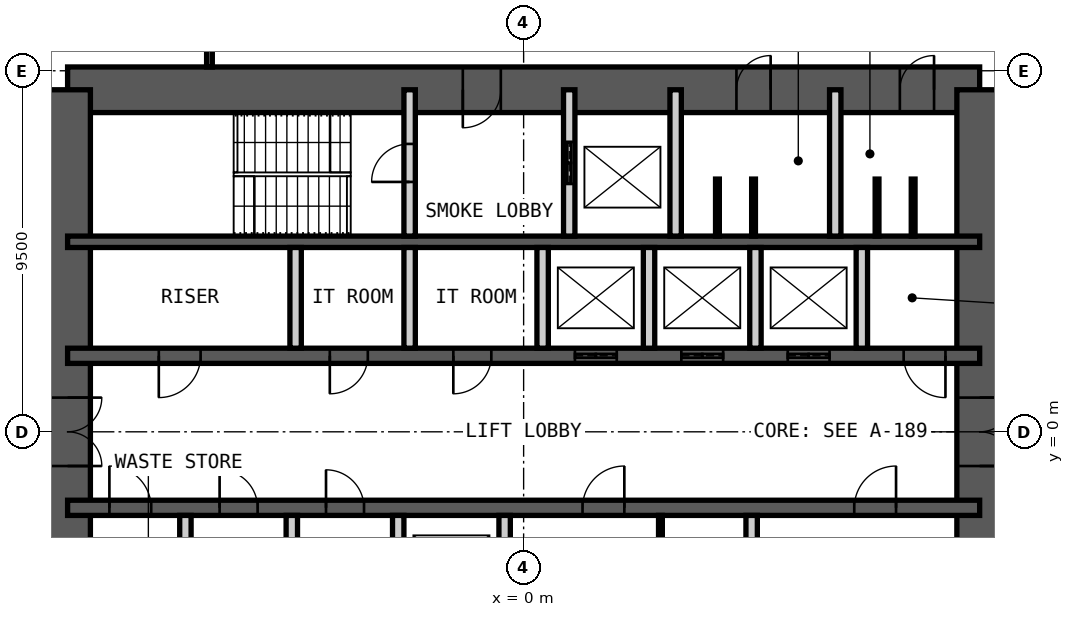
"""IFC4 building model, lengths in metres.
Left out: names, types, materials, properties, quantities, classifications, styles, units other than length and angle.
Written with IfcOpenShell. Run it as: python <this file> out.ifc"""

import sys

from ifc_helpers import new_model, si_unit, direction, frame, frame_2d, origin, place, context, subcontext, project, spatial, rectangle, extrude, element, fill, save


model = new_model("IFC4")
c1 = context("Model", 3, precision=1e-05, world=origin(), true_north=direction((0.0, 1.0)))
c2 = subcontext(c1, "Body", "Model", "MODEL_VIEW")
j1 = project(units=[si_unit("LENGTHUNIT", "METRE"), si_unit("PLANEANGLEUNIT", "RADIAN")], contexts=[c1])
p1 = place(None, origin())
s1 = spatial("IfcSite", under=j1, at=p1, CompositionType="ELEMENT")
p2 = place(p1, origin())
s2 = spatial("IfcBuilding", under=s1, at=p2, CompositionType="ELEMENT")
p3 = place(p2, frame((0.0, 0.0, 222.4)))
s3 = spatial("IfcBuildingStorey", under=s2, at=p3, CompositionType="ELEMENT", Elevation=222.4)
p4 = place(p3, frame((-12.0, 9.0, 0.0), z_axis=(0.0, 0.0, 1.0), x_axis=(1.0, 0.0, 0.0)))
e1 = element("IfcWall", 1, at=p4, inside=s3, PredefinedType="SHEAR", context=c2, shape_type="SweptSolid", body=[
    extrude(rectangle(XDim=24.0, YDim=1.2, at=frame_2d((12.0, 0.0))), origin(), (0.0, 0.0, 1.0), 4.2),
])
p5 = place(p4, frame((10.4, 0.0, 0.0)))
e2 = element("IfcOpeningElement", 2, at=p5, cuts=e1, PredefinedType="OPENING", context=c2, shape_type="SweptSolid", body=[
    extrude(rectangle(XDim=1.0, YDim=2.1, at=frame_2d((0.5, 1.05))), frame((0.0, 0.61, 0.0), z_axis=(0.0, -1.0, 0.0), x_axis=(1.0, 0.0, 0.0)), (0.0, 0.0, 1.0), 1.22),
])
p6 = place(p4, frame((17.6, 0.0, 0.0)))
e3 = element("IfcOpeningElement", 3, at=p6, cuts=e1, PredefinedType="OPENING", context=c2, shape_type="SweptSolid", body=[
    extrude(rectangle(XDim=0.9, YDim=2.1, at=frame_2d((0.45, 1.05))), frame((0.0, 0.61, 0.0), z_axis=(0.0, -1.0, 0.0), x_axis=(1.0, 0.0, 0.0)), (0.0, 0.0, 1.0), 1.22),
])
p7 = place(p4, frame((21.9, 0.0, 0.0)))
e4 = element("IfcOpeningElement", 4, at=p7, cuts=e1, PredefinedType="OPENING", context=c2, shape_type="SweptSolid", body=[
    extrude(rectangle(XDim=0.9, YDim=2.1, at=frame_2d((0.45, 1.05))), frame((0.0, 0.61, 0.0), z_axis=(0.0, -1.0, 0.0), x_axis=(1.0, 0.0, 0.0)), (0.0, 0.0, 1.0), 1.22),
])
p8 = place(p3, frame((12.0, -9.0, 0.0), z_axis=(0.0, 0.0, 1.0), x_axis=(0.0, 1.0, 0.0)))
e5 = element("IfcWall", 5, at=p8, inside=s3, PredefinedType="SHEAR", context=c2, shape_type="SweptSolid", body=[
    extrude(rectangle(XDim=18.0, YDim=1.2, at=frame_2d((9.0, 0.0))), origin(), (0.0, 0.0, 1.0), 4.2),
])
p9 = place(p8, frame((8.1, 0.0, 0.0)))
e6 = element("IfcOpeningElement", 6, at=p9, cuts=e5, PredefinedType="OPENING", context=c2, shape_type="SweptSolid", body=[
    extrude(rectangle(XDim=1.8, YDim=2.1, at=frame_2d((0.9, 1.05))), frame((0.0, 0.61, 0.0), z_axis=(0.0, -1.0, 0.0), x_axis=(1.0, 0.0, 0.0)), (0.0, 0.0, 1.0), 1.22),
])
p10 = place(p3, frame((-12.0, -9.0, 0.0), z_axis=(0.0, 0.0, 1.0), x_axis=(0.0, 1.0, 0.0)))
e7 = element("IfcWall", 7, at=p10, inside=s3, PredefinedType="SHEAR", context=c2, shape_type="SweptSolid", body=[
    extrude(rectangle(XDim=18.0, YDim=1.2, at=frame_2d((9.0, 0.0))), origin(), (0.0, 0.0, 1.0), 4.2),
])
p11 = place(p10, frame((8.1, 0.0, 0.0)))
e8 = element("IfcOpeningElement", 8, at=p11, cuts=e7, PredefinedType="OPENING", context=c2, shape_type="SweptSolid", body=[
    extrude(rectangle(XDim=1.8, YDim=2.1, at=frame_2d((0.9, 1.05))), frame((0.0, 0.61, 0.0), z_axis=(0.0, -1.0, 0.0), x_axis=(1.0, 0.0, 0.0)), (0.0, 0.0, 1.0), 1.22),
])
p12 = place(p3, frame((-12.0, 5.0, 0.0), z_axis=(0.0, 0.0, 1.0), x_axis=(1.0, 0.0, 0.0)))
e9 = element("IfcWall", 9, at=p12, inside=s3, PredefinedType="SHEAR", context=c2, shape_type="SweptSolid", body=[
    extrude(rectangle(XDim=24.0, YDim=0.3, at=frame_2d((12.0, 0.0))), origin(), (0.0, 0.0, 1.0), 4.2),
])
p13 = place(p3, frame((-12.0, 2.0, 0.0), z_axis=(0.0, 0.0, 1.0), x_axis=(1.0, 0.0, 0.0)))
e10 = element("IfcWall", 10, at=p13, inside=s3, PredefinedType="SHEAR", context=c2, shape_type="SweptSolid", body=[
    extrude(rectangle(XDim=24.0, YDim=0.4, at=frame_2d((12.0, 0.0))), origin(), (0.0, 0.0, 1.0), 4.2),
])
p14 = place(p13, frame((2.4, 0.0, 0.0)))
e11 = element("IfcOpeningElement", 11, at=p14, cuts=e10, PredefinedType="OPENING", context=c2, shape_type="SweptSolid", body=[
    extrude(rectangle(XDim=1.1, YDim=2.1, at=frame_2d((0.55, 1.05))), frame((0.0, 0.21, 0.0), z_axis=(0.0, -1.0, 0.0), x_axis=(1.0, 0.0, 0.0)), (0.0, 0.0, 1.0), 0.42),
])
p15 = place(p13, frame((22.0, 0.0, 0.0)))
e12 = element("IfcOpeningElement", 12, at=p15, cuts=e10, PredefinedType="OPENING", context=c2, shape_type="SweptSolid", body=[
    extrude(rectangle(XDim=1.1, YDim=2.1, at=frame_2d((0.55, 1.05))), frame((0.0, 0.21, 0.0), z_axis=(0.0, -1.0, 0.0), x_axis=(1.0, 0.0, 0.0)), (0.0, 0.0, 1.0), 0.42),
])
p16 = place(p13, frame((10.15, 0.0, 0.0)))
e13 = element("IfcOpeningElement", 13, at=p16, cuts=e10, PredefinedType="OPENING", context=c2, shape_type="SweptSolid", body=[
    extrude(rectangle(XDim=1.0, YDim=2.1, at=frame_2d((0.5, 1.05))), frame((0.0, 0.21, 0.0), z_axis=(0.0, -1.0, 0.0), x_axis=(1.0, 0.0, 0.0)), (0.0, 0.0, 1.0), 0.42),
])
p17 = place(p13, frame((6.9, 0.0, 0.0)))
e14 = element("IfcOpeningElement", 14, at=p17, cuts=e10, PredefinedType="OPENING", context=c2, shape_type="SweptSolid", body=[
    extrude(rectangle(XDim=1.0, YDim=2.1, at=frame_2d((0.5, 1.05))), frame((0.0, 0.21, 0.0), z_axis=(0.0, -1.0, 0.0), x_axis=(1.0, 0.0, 0.0)), (0.0, 0.0, 1.0), 0.42),
])
p18 = place(p13, frame((13.35, 0.0, 0.0)))
e15 = element("IfcOpeningElement", 15, at=p18, cuts=e10, PredefinedType="OPENING", context=c2, shape_type="SweptSolid", body=[
    extrude(rectangle(XDim=1.1, YDim=2.4, at=frame_2d((0.55, 1.2))), frame((0.0, 0.21, 0.0), z_axis=(0.0, -1.0, 0.0), x_axis=(1.0, 0.0, 0.0)), (0.0, 0.0, 1.0), 0.42),
])
p19 = place(p13, frame((16.15, 0.0, 0.0)))
e16 = element("IfcOpeningElement", 16, at=p19, cuts=e10, PredefinedType="OPENING", context=c2, shape_type="SweptSolid", body=[
    extrude(rectangle(XDim=1.1, YDim=2.4, at=frame_2d((0.55, 1.2))), frame((0.0, 0.21, 0.0), z_axis=(0.0, -1.0, 0.0), x_axis=(1.0, 0.0, 0.0)), (0.0, 0.0, 1.0), 0.42),
])
p20 = place(p13, frame((18.95, 0.0, 0.0)))
e17 = element("IfcOpeningElement", 17, at=p20, cuts=e10, PredefinedType="OPENING", context=c2, shape_type="SweptSolid", body=[
    extrude(rectangle(XDim=1.1, YDim=2.4, at=frame_2d((0.55, 1.2))), frame((0.0, 0.21, 0.0), z_axis=(0.0, -1.0, 0.0), x_axis=(1.0, 0.0, 0.0)), (0.0, 0.0, 1.0), 0.42),
])
p21 = place(p3, frame((-12.0, -2.0, 0.0), z_axis=(0.0, 0.0, 1.0), x_axis=(1.0, 0.0, 0.0)))
e18 = element("IfcWall", 18, at=p21, inside=s3, PredefinedType="SHEAR", context=c2, shape_type="SweptSolid", body=[
    extrude(rectangle(XDim=24.0, YDim=0.4, at=frame_2d((12.0, 0.0))), origin(), (0.0, 0.0, 1.0), 4.2),
])
p22 = place(p21, frame((1.1, 0.0, 0.0)))
e19 = element("IfcOpeningElement", 19, at=p22, cuts=e18, PredefinedType="OPENING", context=c2, shape_type="SweptSolid", body=[
    extrude(rectangle(XDim=1.1, YDim=2.1, at=frame_2d((0.55, 1.05))), frame((0.0, 0.21, 0.0), z_axis=(0.0, -1.0, 0.0), x_axis=(1.0, 0.0, 0.0)), (0.0, 0.0, 1.0), 0.42),
])
p23 = place(p21, frame((13.55, 0.0, 0.0)))
e20 = element("IfcOpeningElement", 20, at=p23, cuts=e18, PredefinedType="OPENING", context=c2, shape_type="SweptSolid", body=[
    extrude(rectangle(XDim=1.1, YDim=2.1, at=frame_2d((0.55, 1.05))), frame((0.0, 0.21, 0.0), z_axis=(0.0, -1.0, 0.0), x_axis=(1.0, 0.0, 0.0)), (0.0, 0.0, 1.0), 0.42),
])
p24 = place(p21, frame((20.7, 0.0, 0.0)))
e21 = element("IfcOpeningElement", 21, at=p24, cuts=e18, PredefinedType="OPENING", context=c2, shape_type="SweptSolid", body=[
    extrude(rectangle(XDim=1.1, YDim=2.1, at=frame_2d((0.55, 1.05))), frame((0.0, 0.21, 0.0), z_axis=(0.0, -1.0, 0.0), x_axis=(1.0, 0.0, 0.0)), (0.0, 0.0, 1.0), 0.42),
])
p25 = place(p21, frame((4.0, 0.0, 0.0)))
e22 = element("IfcOpeningElement", 22, at=p25, cuts=e18, PredefinedType="OPENING", context=c2, shape_type="SweptSolid", body=[
    extrude(rectangle(XDim=1.0, YDim=2.1, at=frame_2d((0.5, 1.05))), frame((0.0, 0.21, 0.0), z_axis=(0.0, -1.0, 0.0), x_axis=(1.0, 0.0, 0.0)), (0.0, 0.0, 1.0), 0.42),
])
p26 = place(p21, frame((6.8, 0.0, 0.0)))
e23 = element("IfcOpeningElement", 23, at=p26, cuts=e18, PredefinedType="OPENING", context=c2, shape_type="SweptSolid", body=[
    extrude(rectangle(XDim=1.0, YDim=2.1, at=frame_2d((0.5, 1.05))), frame((0.0, 0.21, 0.0), z_axis=(0.0, -1.0, 0.0), x_axis=(1.0, 0.0, 0.0)), (0.0, 0.0, 1.0), 0.42),
])
p27 = place(p3, frame((-3.0, 5.15, 0.0), z_axis=(0.0, 0.0, 1.0), x_axis=(0.0, 1.0, 0.0)))
e24 = element("IfcWall", 24, at=p27, inside=s3, PredefinedType="PARTITIONING", context=c2, shape_type="SweptSolid", body=[
    extrude(rectangle(XDim=3.85, YDim=0.3, at=frame_2d((1.925, 0.0))), origin(), (0.0, 0.0, 1.0), 3.98),
])
p28 = place(p27, frame((1.425, 0.0, 0.0)))
e25 = element("IfcOpeningElement", 25, at=p28, cuts=e24, PredefinedType="OPENING", context=c2, shape_type="SweptSolid", body=[
    extrude(rectangle(XDim=1.0, YDim=2.1, at=frame_2d((0.5, 1.05))), frame((0.0, 0.16, 0.0), z_axis=(0.0, -1.0, 0.0), x_axis=(1.0, 0.0, 0.0)), (0.0, 0.0, 1.0), 0.32),
])
p29 = place(p3, frame((1.2, 5.15, 0.0), z_axis=(0.0, 0.0, 1.0), x_axis=(0.0, 1.0, 0.0)))
e26 = element("IfcWall", 26, at=p29, inside=s3, PredefinedType="PARTITIONING", context=c2, shape_type="SweptSolid", body=[
    extrude(rectangle(XDim=3.85, YDim=0.3, at=frame_2d((1.925, 0.0))), origin(), (0.0, 0.0, 1.0), 3.98),
])
p30 = place(p29, frame((1.375, 0.0, 0.0)))
e27 = element("IfcOpeningElement", 27, at=p30, cuts=e26, PredefinedType="OPENING", context=c2, shape_type="SweptSolid", body=[
    extrude(rectangle(XDim=1.1, YDim=2.4, at=frame_2d((0.55, 1.2))), frame((0.0, 0.16, 0.0), z_axis=(0.0, -1.0, 0.0), x_axis=(1.0, 0.0, 0.0)), (0.0, 0.0, 1.0), 0.32),
])
for number, where, z_axis, x_axis in (
    (28, (4.0, 5.15, 0.0), (0.0, 0.0, 1.0), (0.0, 1.0, 0.0)),
    (29, (8.2, 5.15, 0.0), (0.0, 0.0, 1.0), (0.0, 1.0, 0.0)),
):
    element("IfcWall", number, at=place(p3, frame(where, z_axis=z_axis, x_axis=x_axis)), inside=s3, PredefinedType="PARTITIONING", context=c2, shape_type="SweptSolid", body=[
        extrude(rectangle(XDim=3.85, YDim=0.3, at=frame_2d((1.925, 0.0))), origin(), (0.0, 0.0, 1.0), 3.98),
    ])
for number, where, z_axis, x_axis in (
    (30, (-6.0, 2.2, 0.0), (0.0, 0.0, 1.0), (0.0, 1.0, 0.0)),
    (31, (-3.0, 2.2, 0.0), (0.0, 0.0, 1.0), (0.0, 1.0, 0.0)),
    (32, (0.5, 2.2, 0.0), (0.0, 0.0, 1.0), (0.0, 1.0, 0.0)),
    (33, (3.3, 2.2, 0.0), (0.0, 0.0, 1.0), (0.0, 1.0, 0.0)),
    (34, (6.1, 2.2, 0.0), (0.0, 0.0, 1.0), (0.0, 1.0, 0.0)),
    (35, (8.9, 2.2, 0.0), (0.0, 0.0, 1.0), (0.0, 1.0, 0.0)),
    (36, (-8.9, -4.85, 0.0), (0.0, 0.0, 1.0), (0.0, 1.0, 0.0)),
    (37, (-6.1, -4.85, 0.0), (0.0, 0.0, 1.0), (0.0, 1.0, 0.0)),
    (38, (-3.3, -4.85, 0.0), (0.0, 0.0, 1.0), (0.0, 1.0, 0.0)),
    (39, (-0.5, -4.85, 0.0), (0.0, 0.0, 1.0), (0.0, 1.0, 0.0)),
    (40, (6.0, -4.85, 0.0), (0.0, 0.0, 1.0), (0.0, 1.0, 0.0)),
):
    element("IfcWall", number, at=place(p3, frame(where, z_axis=z_axis, x_axis=x_axis)), inside=s3, PredefinedType="PARTITIONING", context=c2, shape_type="SweptSolid", body=[
        extrude(rectangle(XDim=2.65, YDim=0.3, at=frame_2d((1.325, 0.0))), origin(), (0.0, 0.0, 1.0), 3.98),
    ])
p31 = place(p3, frame((3.6, -4.85, 0.0), z_axis=(0.0, 0.0, 1.0), x_axis=(0.0, 1.0, 0.0)))
e41 = element("IfcWall", 41, at=p31, inside=s3, PredefinedType="PARTITIONING", context=c2, shape_type="SweptSolid", body=[
    extrude(rectangle(XDim=2.65, YDim=0.1, at=frame_2d((1.325, 0.0))), origin(), (0.0, 0.0, 1.0), 3.98),
])
p32 = place(p31, frame((0.1, 0.0, 0.0)))
e42 = element("IfcOpeningElement", 42, at=p32, cuts=e41, PredefinedType="OPENING", context=c2, shape_type="SweptSolid", body=[
    extrude(rectangle(XDim=1.0, YDim=2.4, at=frame_2d((0.5, 1.2))), frame((0.0, 0.06, 0.0), z_axis=(0.0, -1.0, 0.0), x_axis=(1.0, 0.0, 0.0)), (0.0, 0.0, 1.0), 0.12),
])
for number, where, z_axis, x_axis in (
    (43, (5.1, 5.15, 0.0), (0.0, 0.0, 1.0), (0.0, 1.0, 0.0)),
    (44, (6.05, 5.15, 0.0), (0.0, 0.0, 1.0), (0.0, 1.0, 0.0)),
    (45, (9.3, 5.15, 0.0), (0.0, 0.0, 1.0), (0.0, 1.0, 0.0)),
    (46, (10.25, 5.15, 0.0), (0.0, 0.0, 1.0), (0.0, 1.0, 0.0)),
):
    element("IfcWall", number, at=place(p3, frame(where, z_axis=z_axis, x_axis=x_axis)), inside=s3, PredefinedType="PARTITIONING", context=c2, shape_type="SweptSolid", body=[
        extrude(rectangle(XDim=1.5, YDim=0.1, at=frame_2d((0.75, 0.0))), origin(), (0.0, 0.0, 1.0), 2.1),
    ])
p33 = place(p3, frame((-8.267, 9.6, 0.0), z_axis=(0.0, 0.0, 1.0), x_axis=(0.0, 1.0, 0.0)))
e47 = element("IfcWall", 47, at=p33, inside=s3, PredefinedType="PARTITIONING", context=c2, shape_type="SweptSolid", body=[
    extrude(rectangle(XDim=1.875, YDim=0.15, at=frame_2d((0.938, 0.0))), origin(), (0.0, 0.0, 1.0), 4.03),
])
p34 = place(p5, origin())
e48 = element("IfcDoor", 48, at=p34, inside=s3, OperationType="SINGLE_SWING_LEFT", PredefinedType="DOOR", context=c2, shape_type="SweptSolid", body=[
    extrude(rectangle(XDim=1.0, YDim=2.1, at=frame_2d((0.5, 1.05))), frame((0.0, 0.025, 0.0), z_axis=(0.0, -1.0, 0.0), x_axis=(1.0, 0.0, 0.0)), (0.0, 0.0, 1.0), 0.05),
])
fill(e2, e48)
p35 = place(p6, origin())
e49 = element("IfcDoor", 49, at=p35, inside=s3, OperationType="SINGLE_SWING_LEFT", PredefinedType="DOOR", context=c2, shape_type="SweptSolid", body=[
    extrude(rectangle(XDim=0.9, YDim=2.1, at=frame_2d((0.45, 1.05))), frame((0.0, 0.025, 0.0), z_axis=(0.0, -1.0, 0.0), x_axis=(1.0, 0.0, 0.0)), (0.0, 0.0, 1.0), 0.05),
])
fill(e3, e49)
p36 = place(p7, origin())
e50 = element("IfcDoor", 50, at=p36, inside=s3, OperationType="SINGLE_SWING_LEFT", PredefinedType="DOOR", context=c2, shape_type="SweptSolid", body=[
    extrude(rectangle(XDim=0.9, YDim=2.1, at=frame_2d((0.45, 1.05))), frame((0.0, 0.025, 0.0), z_axis=(0.0, -1.0, 0.0), x_axis=(1.0, 0.0, 0.0)), (0.0, 0.0, 1.0), 0.05),
])
fill(e4, e50)
p37 = place(p28, origin())
e51 = element("IfcDoor", 51, at=p37, inside=s3, OperationType="SINGLE_SWING_RIGHT", PredefinedType="DOOR", context=c2, shape_type="SweptSolid", body=[
    extrude(rectangle(XDim=1.0, YDim=2.1, at=frame_2d((0.5, 1.05))), frame((0.0, 0.025, 0.0), z_axis=(0.0, -1.0, 0.0), x_axis=(1.0, 0.0, 0.0)), (0.0, 0.0, 1.0), 0.05),
])
fill(e25, e51)
p38 = place(p14, origin())
e52 = element("IfcDoor", 52, at=p38, inside=s3, OperationType="SINGLE_SWING_LEFT", PredefinedType="DOOR", context=c2, shape_type="SweptSolid", body=[
    extrude(rectangle(XDim=1.1, YDim=2.1, at=frame_2d((0.55, 1.05))), frame((0.0, 0.025, 0.0), z_axis=(0.0, -1.0, 0.0), x_axis=(1.0, 0.0, 0.0)), (0.0, 0.0, 1.0), 0.05),
])
fill(e11, e52)
p39 = place(p22, origin())
e53 = element("IfcDoor", 53, at=p39, inside=s3, OperationType="SINGLE_SWING_RIGHT", PredefinedType="DOOR", context=c2, shape_type="SweptSolid", body=[
    extrude(rectangle(XDim=1.1, YDim=2.1, at=frame_2d((0.55, 1.05))), frame((0.0, 0.025, 0.0), z_axis=(0.0, -1.0, 0.0), x_axis=(1.0, 0.0, 0.0)), (0.0, 0.0, 1.0), 0.05),
])
fill(e19, e53)
p40 = place(p15, origin())
e54 = element("IfcDoor", 54, at=p40, inside=s3, OperationType="SINGLE_SWING_RIGHT", PredefinedType="DOOR", context=c2, shape_type="SweptSolid", body=[
    extrude(rectangle(XDim=1.1, YDim=2.1, at=frame_2d((0.55, 1.05))), frame((0.0, 0.025, 0.0), z_axis=(0.0, -1.0, 0.0), x_axis=(1.0, 0.0, 0.0)), (0.0, 0.0, 1.0), 0.05),
])
fill(e12, e54)
p41 = place(p16, origin())
e55 = element("IfcDoor", 55, at=p41, inside=s3, OperationType="SINGLE_SWING_LEFT", PredefinedType="DOOR", context=c2, shape_type="SweptSolid", body=[
    extrude(rectangle(XDim=1.0, YDim=2.1, at=frame_2d((0.5, 1.05))), frame((0.0, 0.025, 0.0), z_axis=(0.0, -1.0, 0.0), x_axis=(1.0, 0.0, 0.0)), (0.0, 0.0, 1.0), 0.05),
])
fill(e13, e55)
p42 = place(p23, origin())
e56 = element("IfcDoor", 56, at=p42, inside=s3, OperationType="SINGLE_SWING_LEFT", PredefinedType="DOOR", context=c2, shape_type="SweptSolid", body=[
    extrude(rectangle(XDim=1.1, YDim=2.1, at=frame_2d((0.55, 1.05))), frame((0.0, 0.025, 0.0), z_axis=(0.0, -1.0, 0.0), x_axis=(1.0, 0.0, 0.0)), (0.0, 0.0, 1.0), 0.05),
])
fill(e20, e56)
p43 = place(p24, origin())
e57 = element("IfcDoor", 57, at=p43, inside=s3, OperationType="SINGLE_SWING_LEFT", PredefinedType="DOOR", context=c2, shape_type="SweptSolid", body=[
    extrude(rectangle(XDim=1.1, YDim=2.1, at=frame_2d((0.55, 1.05))), frame((0.0, 0.025, 0.0), z_axis=(0.0, -1.0, 0.0), x_axis=(1.0, 0.0, 0.0)), (0.0, 0.0, 1.0), 0.05),
])
fill(e21, e57)
p44 = place(p9, origin())
e58 = element("IfcDoor", 58, at=p44, inside=s3, OperationType="DOUBLE_DOOR_DOUBLE_SWING", PredefinedType="DOOR", context=c2, shape_type="SweptSolid", body=[
    extrude(rectangle(XDim=1.8, YDim=2.1, at=frame_2d((0.9, 1.05))), frame((0.0, 0.025, 0.0), z_axis=(0.0, -1.0, 0.0), x_axis=(1.0, 0.0, 0.0)), (0.0, 0.0, 1.0), 0.05),
])
fill(e6, e58)
p45 = place(p11, origin())
e59 = element("IfcDoor", 59, at=p45, inside=s3, OperationType="DOUBLE_DOOR_DOUBLE_SWING", PredefinedType="DOOR", context=c2, shape_type="SweptSolid", body=[
    extrude(rectangle(XDim=1.8, YDim=2.1, at=frame_2d((0.9, 1.05))), frame((0.0, 0.025, 0.0), z_axis=(0.0, -1.0, 0.0), x_axis=(1.0, 0.0, 0.0)), (0.0, 0.0, 1.0), 0.05),
])
fill(e8, e59)
p46 = place(p30, origin())
e60 = element("IfcDoor", 60, at=p46, inside=s3, OperationType="DOUBLE_DOOR_SLIDING", PredefinedType="DOOR", context=c2, shape_type="SweptSolid", body=[
    extrude(rectangle(XDim=1.1, YDim=2.4, at=frame_2d((0.55, 1.2))), frame((0.0, 0.025, 0.0), z_axis=(0.0, -1.0, 0.0), x_axis=(1.0, 0.0, 0.0)), (0.0, 0.0, 1.0), 0.05),
])
fill(e27, e60)
p47 = place(p17, origin())
e61 = element("IfcDoor", 61, at=p47, inside=s3, OperationType="SINGLE_SWING_LEFT", PredefinedType="DOOR", context=c2, shape_type="SweptSolid", body=[
    extrude(rectangle(XDim=1.0, YDim=2.1, at=frame_2d((0.5, 1.05))), frame((0.0, 0.025, 0.0), z_axis=(0.0, -1.0, 0.0), x_axis=(1.0, 0.0, 0.0)), (0.0, 0.0, 1.0), 0.05),
])
fill(e14, e61)
p48 = place(p18, origin())
e62 = element("IfcDoor", 62, at=p48, inside=s3, OperationType="DOUBLE_DOOR_SLIDING", PredefinedType="DOOR", context=c2, shape_type="SweptSolid", body=[
    extrude(rectangle(XDim=1.1, YDim=2.4, at=frame_2d((0.55, 1.2))), frame((0.0, 0.025, 0.0), z_axis=(0.0, -1.0, 0.0), x_axis=(1.0, 0.0, 0.0)), (0.0, 0.0, 1.0), 0.05),
])
fill(e15, e62)
p49 = place(p19, origin())
e63 = element("IfcDoor", 63, at=p49, inside=s3, OperationType="DOUBLE_DOOR_SLIDING", PredefinedType="DOOR", context=c2, shape_type="SweptSolid", body=[
    extrude(rectangle(XDim=1.1, YDim=2.4, at=frame_2d((0.55, 1.2))), frame((0.0, 0.025, 0.0), z_axis=(0.0, -1.0, 0.0), x_axis=(1.0, 0.0, 0.0)), (0.0, 0.0, 1.0), 0.05),
])
fill(e16, e63)
p50 = place(p20, origin())
e64 = element("IfcDoor", 64, at=p50, inside=s3, OperationType="DOUBLE_DOOR_SLIDING", PredefinedType="DOOR", context=c2, shape_type="SweptSolid", body=[
    extrude(rectangle(XDim=1.1, YDim=2.4, at=frame_2d((0.55, 1.2))), frame((0.0, 0.025, 0.0), z_axis=(0.0, -1.0, 0.0), x_axis=(1.0, 0.0, 0.0)), (0.0, 0.0, 1.0), 0.05),
])
fill(e17, e64)
p51 = place(p25, origin())
e65 = element("IfcDoor", 65, at=p51, inside=s3, OperationType="SINGLE_SWING_RIGHT", PredefinedType="DOOR", context=c2, shape_type="SweptSolid", body=[
    extrude(rectangle(XDim=1.0, YDim=2.1, at=frame_2d((0.5, 1.05))), frame((0.0, 0.025, 0.0), z_axis=(0.0, -1.0, 0.0), x_axis=(1.0, 0.0, 0.0)), (0.0, 0.0, 1.0), 0.05),
])
fill(e22, e65)
p52 = place(p26, origin())
e66 = element("IfcDoor", 66, at=p52, inside=s3, OperationType="SINGLE_SWING_RIGHT", PredefinedType="DOOR", context=c2, shape_type="SweptSolid", body=[
    extrude(rectangle(XDim=1.0, YDim=2.1, at=frame_2d((0.5, 1.05))), frame((0.0, 0.025, 0.0), z_axis=(0.0, -1.0, 0.0), x_axis=(1.0, 0.0, 0.0)), (0.0, 0.0, 1.0), 0.05),
])
fill(e23, e66)
save(model, sys.argv[1])
